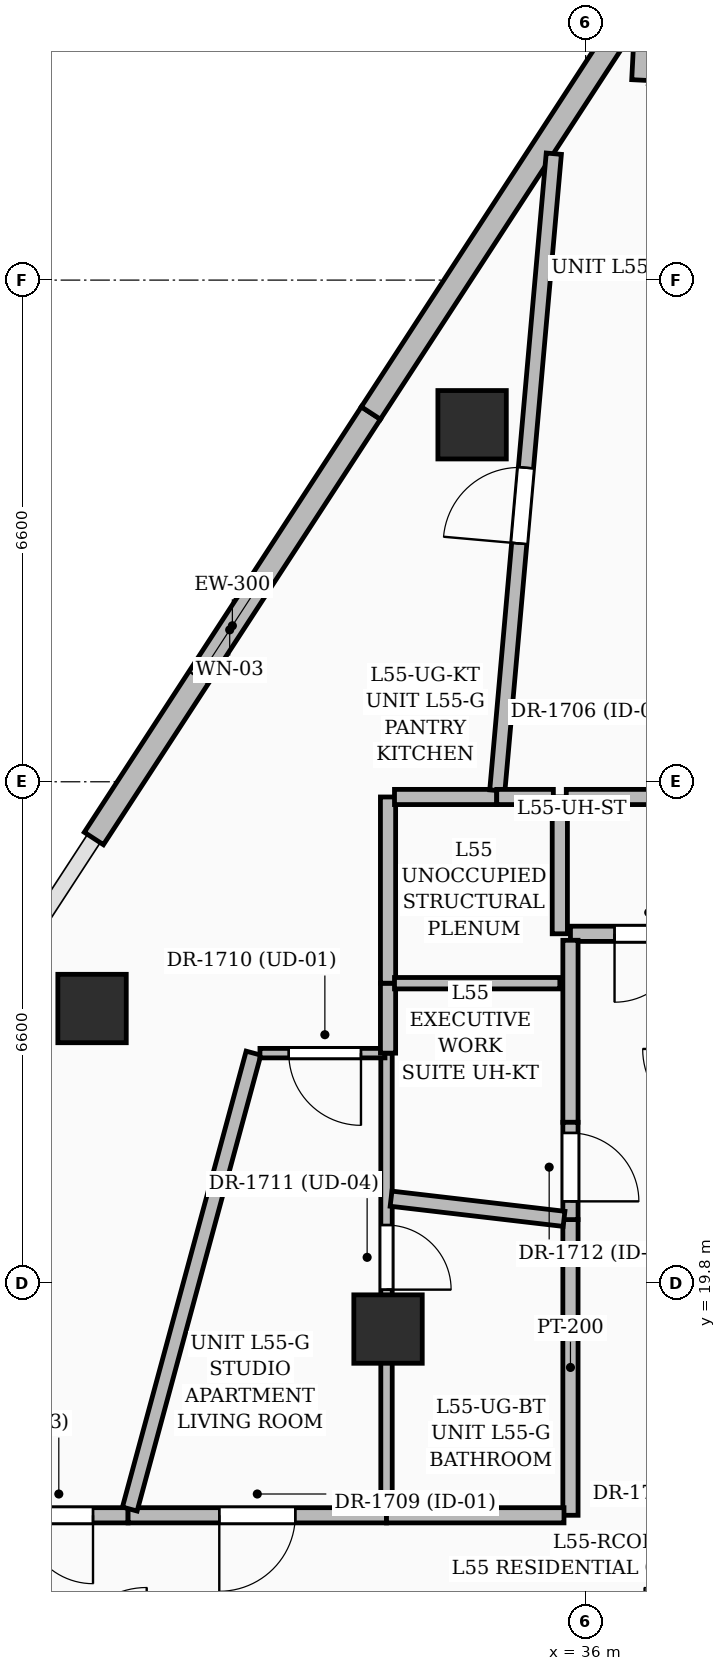
"""IFC4 building model, lengths in metres.
Left out: names, types, materials, properties, quantities, classifications, styles, units other than length and angle.
Written with IfcOpenShell. Run it as: python <this file> out.ifc"""

import sys

from ifc_helpers import new_model, si_unit, direction, frame, frame_2d, origin, origin_2d, place, context, subcontext, project, spatial, rectangle, extrude, element, fill, save


model = new_model("IFC4")
c1 = context("Model", 3, precision=1e-05, world=origin(), true_north=direction((0.0, 1.0)))
c2 = subcontext(c1, "Body", "Model", "MODEL_VIEW")
j1 = project(units=[si_unit("LENGTHUNIT", "METRE"), si_unit("PLANEANGLEUNIT", "RADIAN")], contexts=[c1])
p1 = place(None, origin())
s1 = spatial("IfcSite", under=j1, at=p1, CompositionType="ELEMENT")
p2 = place(p1, origin())
s2 = spatial("IfcBuilding", under=s1, at=p2, CompositionType="ELEMENT")
p3 = place(p2, frame((0.0, 0.0, 214.5)))
s3 = spatial("IfcBuildingStorey", under=s2, at=p3, CompositionType="ELEMENT", Elevation=214.5)
for number, where, z_axis, x_axis in (
    (1, (33.4, 19.2, 0.0), (0.0, 0.0, 1.0), (1.0, 0.0, 0.0)),
    (2, (34.506, 31.097, 0.0), (0.0, 0.0, 1.0), (1.0, 0.0, 0.0)),
    (3, (29.506, 23.417, 0.0), (0.0, 0.0, 1.0), (1.0, 0.0, 0.0)),
):
    element("IfcColumn", number, at=place(p3, frame(where, z_axis=z_axis, x_axis=x_axis)), inside=s3, PredefinedType="COLUMN", context=c2, shape_type="SweptSolid", body=[
        extrude(rectangle(XDim=0.9, YDim=0.9, at=origin_2d()), origin(), (0.0, 0.0, 1.0), 3.75),
    ])
p4 = place(p3, frame((29.53, 25.654, 0.0), z_axis=(0.0, 0.0, 1.0), x_axis=(0.545624217243, 0.838029959821, 0.0)))
e4 = element("IfcWall", 4, at=p4, inside=s3, PredefinedType="SOLIDWALL", context=c2, shape_type="SweptSolid", body=[
    extrude(rectangle(XDim=6.679, YDim=0.3, at=frame_2d((3.339, 0.0))), origin(), (0.0, 0.0, 1.0), 3.5),
])
p5 = place(p4, frame((2.525, 0.0, 0.6)))
e5 = element("IfcOpeningElement", 5, at=p5, cuts=e4, PredefinedType="OPENING", context=c2, shape_type="SweptSolid", body=[
    extrude(rectangle(XDim=1.5, YDim=2.1, at=frame_2d((0.75, 1.05))), frame((0.0, 0.16, 0.0), z_axis=(0.0, -1.0, 0.0), x_axis=(1.0, 0.0, 0.0)), (0.0, 0.0, 1.0), 0.32),
])
p6 = place(p3, frame((33.174, 31.251, 0.0), z_axis=(0.0, 0.0, 1.0), x_axis=(0.545624217243, 0.838029959821, 0.0)))
e6 = element("IfcWall", 6, at=p6, inside=s3, PredefinedType="SOLIDWALL", context=c2, shape_type="SweptSolid", body=[
    extrude(rectangle(XDim=6.679, YDim=0.3, at=frame_2d((3.339, 0.0))), origin(), (0.0, 0.0, 1.0), 3.5),
])
p7 = place(p3, frame((36.795, 36.394, 0.0), z_axis=(0.0, 0.0, 1.0), x_axis=(-0.051035290984, -0.998696850438, 0.0)))
e7 = element("IfcWall", 7, at=p7, inside=s3, PredefinedType="SOLIDWALL", context=c2, shape_type="SweptSolid", body=[
    extrude(rectangle(XDim=0.765, YDim=0.3, at=frame_2d((0.383, 0.0))), origin(), (0.0, 0.0, 1.0), 3.5),
])
p8 = place(p3, frame((29.98, 16.75, 0.0), z_axis=(0.0, 0.0, 1.0), x_axis=(-1.0, 0.0, 0.0)))
e8 = element("IfcWall", 8, at=p8, inside=s3, PredefinedType="PARTITIONING", context=c2, shape_type="SweptSolid", body=[
    extrude(rectangle(XDim=1.845, YDim=0.2, at=frame_2d((0.922, 0.0))), origin(), (0.0, 0.0, 1.0), 3.5),
])
p9 = place(p8, frame((0.461, 0.0, 0.0)))
e9 = element("IfcOpeningElement", 9, at=p9, cuts=e8, PredefinedType="OPENING", context=c2, shape_type="SweptSolid", body=[
    extrude(rectangle(XDim=0.9, YDim=2.1, at=frame_2d((0.45, 1.05))), frame((0.0, 0.11, 0.0), z_axis=(0.0, -1.0, 0.0), x_axis=(1.0, 0.0, 0.0)), (0.0, 0.0, 1.0), 0.22),
])
p10 = place(p3, frame((33.38, 16.75, 0.0), z_axis=(0.0, 0.0, 1.0), x_axis=(-1.0, 0.0, 0.0)))
e10 = element("IfcWall", 10, at=p10, inside=s3, PredefinedType="PARTITIONING", context=c2, shape_type="SweptSolid", body=[
    extrude(rectangle(XDim=3.4, YDim=0.2, at=frame_2d((1.7, 0.0))), origin(), (0.0, 0.0, 1.0), 3.5),
])
p11 = place(p10, frame((1.2, 0.0, 0.0)))
e11 = element("IfcOpeningElement", 11, at=p11, cuts=e10, PredefinedType="OPENING", context=c2, shape_type="SweptSolid", body=[
    extrude(rectangle(XDim=1.0, YDim=2.2, at=frame_2d((0.5, 1.1))), frame((0.0, 0.11, 0.0), z_axis=(0.0, -1.0, 0.0), x_axis=(1.0, 0.0, 0.0)), (0.0, 0.0, 1.0), 0.22),
])
p12 = place(p3, frame((35.8, 20.64, 0.0), z_axis=(0.0, 0.0, 1.0), x_axis=(0.0, -1.0, 0.0)))
e12 = element("IfcWall", 12, at=p12, inside=s3, PredefinedType="PARTITIONING", context=c2, shape_type="SweptSolid", body=[
    extrude(rectangle(XDim=3.89, YDim=0.2, at=frame_2d((1.945, 0.0))), origin(), (0.0, 0.0, 1.0), 3.5),
])
p13 = place(p3, frame((35.715, 16.75, 0.0), z_axis=(0.0, 0.0, 1.0), x_axis=(-1.0, 0.0, 0.0)))
e13 = element("IfcWall", 13, at=p13, inside=s3, PredefinedType="PARTITIONING", context=c2, shape_type="SweptSolid", body=[
    extrude(rectangle(XDim=2.335, YDim=0.2, at=frame_2d((1.167, 0.0))), origin(), (0.0, 0.0, 1.0), 2.685),
])
p14 = place(p3, frame((37.705, 24.4, 0.0), z_axis=(0.0, 0.0, 1.0), x_axis=(-1.0, 0.0, 0.0)))
e14 = element("IfcWall", 14, at=p14, inside=s3, PredefinedType="PARTITIONING", context=c2, shape_type="SweptSolid", body=[
    extrude(rectangle(XDim=1.905, YDim=0.2, at=frame_2d((0.953, 0.0))), origin(), (0.0, 0.0, 1.0), 2.685),
])
p15 = place(p14, frame((0.425, 0.0, 0.0)))
e15 = element("IfcOpeningElement", 15, at=p15, cuts=e14, PredefinedType="OPENING", context=c2, shape_type="SweptSolid", body=[
    extrude(rectangle(XDim=0.9, YDim=2.1, at=frame_2d((0.45, 1.05))), frame((0.0, 0.11, 0.0), z_axis=(0.0, -1.0, 0.0), x_axis=(1.0, 0.0, 0.0)), (0.0, 0.0, 1.0), 0.22),
])
p16 = place(p3, frame((35.8, 24.315, 0.0), z_axis=(0.0, 0.0, 1.0), x_axis=(0.0, -1.0, 0.0)))
e16 = element("IfcWall", 16, at=p16, inside=s3, PredefinedType="PARTITIONING", context=c2, shape_type="SweptSolid", body=[
    extrude(rectangle(XDim=2.395, YDim=0.2, at=frame_2d((1.198, 0.0))), origin(), (0.0, 0.0, 1.0), 2.685),
])
p17 = place(p3, frame((35.8, 21.92, 0.0), z_axis=(0.0, 0.0, 1.0), x_axis=(0.0, -1.0, 0.0)))
e17 = element("IfcWall", 17, at=p17, inside=s3, PredefinedType="PARTITIONING", context=c2, shape_type="SweptSolid", body=[
    extrude(rectangle(XDim=1.28, YDim=0.2, at=frame_2d((0.64, 0.0))), origin(), (0.0, 0.0, 1.0), 3.5),
])
p18 = place(p17, frame((0.14, 0.0, 0.0)))
e18 = element("IfcOpeningElement", 18, at=p18, cuts=e17, PredefinedType="OPENING", context=c2, shape_type="SweptSolid", body=[
    extrude(rectangle(XDim=0.9, YDim=2.1, at=frame_2d((0.45, 1.05))), frame((0.0, 0.11, 0.0), z_axis=(0.0, -1.0, 0.0), x_axis=(1.0, 0.0, 0.0)), (0.0, 0.0, 1.0), 0.22),
])
p19 = place(p3, frame((30.002, 16.832, 0.0), z_axis=(0.0, 0.0, 1.0), x_axis=(0.261897318596, 0.965095743702, 0.0)))
e19 = element("IfcWall", 19, at=p19, inside=s3, PredefinedType="PARTITIONING", context=c2, shape_type="SweptSolid", body=[
    extrude(rectangle(XDim=6.215, YDim=0.2, at=frame_2d((3.107, 0.0))), origin(), (0.0, 0.0, 1.0), 2.685),
])
p20 = place(p3, frame((33.38, 22.83, 0.0), z_axis=(0.0, 0.0, 1.0), x_axis=(0.0, -1.0, 0.0)))
e20 = element("IfcWall", 20, at=p20, inside=s3, PredefinedType="PARTITIONING", context=c2, shape_type="SweptSolid", body=[
    extrude(rectangle(XDim=5.995, YDim=0.15, at=frame_2d((2.998, 0.0))), origin(), (0.0, 0.0, 1.0), 2.685),
])
p21 = place(p20, frame((2.261, 0.0, 0.0)))
e21 = element("IfcOpeningElement", 21, at=p21, cuts=e20, PredefinedType="OPENING", context=c2, shape_type="SweptSolid", body=[
    extrude(rectangle(XDim=0.85, YDim=2.1, at=frame_2d((0.425, 1.05))), frame((0.0, 0.085, 0.0), z_axis=(0.0, -1.0, 0.0), x_axis=(1.0, 0.0, 0.0)), (0.0, 0.0, 1.0), 0.17),
])
p22 = place(p3, frame((33.36, 22.83, 0.0), z_axis=(0.0, 0.0, 1.0), x_axis=(-1.0, 0.0, 0.0)))
e22 = element("IfcWall", 22, at=p22, inside=s3, PredefinedType="PARTITIONING", context=c2, shape_type="SweptSolid", body=[
    extrude(rectangle(XDim=1.645, YDim=0.125, at=frame_2d((0.823, 0.0))), origin(), (0.0, 0.0, 1.0), 2.859),
])
p23 = place(p22, frame((0.316, 0.0, 0.0)))
e23 = element("IfcOpeningElement", 23, at=p23, cuts=e22, PredefinedType="OPENING", context=c2, shape_type="SweptSolid", body=[
    extrude(rectangle(XDim=0.95, YDim=2.2, at=frame_2d((0.475, 1.1))), frame((0.0, 0.072, 0.0), z_axis=(0.0, -1.0, 0.0), x_axis=(1.0, 0.0, 0.0)), (0.0, 0.0, 1.0), 0.145),
])
p24 = place(p3, frame((35.716, 20.65, 0.0), z_axis=(0.0, 0.0, 1.0), x_axis=(-0.993270086926, 0.11582113114, 0.0)))
e24 = element("IfcWall", 24, at=p24, inside=s3, PredefinedType="PARTITIONING", context=c2, shape_type="SweptSolid", body=[
    extrude(rectangle(XDim=2.291, YDim=0.2, at=frame_2d((1.146, 0.0))), origin(), (0.0, 0.0, 1.0), 2.685),
])
p25 = place(p3, frame((33.4, 22.83, 0.0), z_axis=(0.0, 0.0, 1.0), x_axis=(0.0, 1.0, 0.0)))
e25 = element("IfcWall", 25, at=p25, inside=s3, PredefinedType="PARTITIONING", context=c2, shape_type="SweptSolid", body=[
    extrude(rectangle(XDim=0.92, YDim=0.2, at=frame_2d((0.46, 0.0))), origin(), (0.0, 0.0, 1.0), 3.5),
])
p26 = place(p3, frame((33.4, 23.75, 0.0), z_axis=(0.0, 0.0, 1.0), x_axis=(0.0, 1.0, 0.0)))
e26 = element("IfcWall", 26, at=p26, inside=s3, PredefinedType="PARTITIONING", context=c2, shape_type="SweptSolid", body=[
    extrude(rectangle(XDim=2.45, YDim=0.2, at=frame_2d((1.225, 0.0))), origin(), (0.0, 0.0, 1.0), 2.859),
])
p27 = place(p3, frame((33.485, 26.2, 0.0), z_axis=(0.0, 0.0, 1.0), x_axis=(1.0, 0.0, 0.0)))
e27 = element("IfcWall", 27, at=p27, inside=s3, PredefinedType="PARTITIONING", context=c2, shape_type="SweptSolid", body=[
    extrude(rectangle(XDim=1.345, YDim=0.2, at=frame_2d((0.672, 0.0))), origin(), (0.0, 0.0, 1.0), 2.859),
])
p28 = place(p3, frame((34.838, 26.285, 0.0), z_axis=(0.0, 0.0, 1.0), x_axis=(0.088352923437, 0.996089233412, 0.0)))
e28 = element("IfcWall", 28, at=p28, inside=s3, PredefinedType="PARTITIONING", context=c2, shape_type="SweptSolid", body=[
    extrude(rectangle(XDim=8.411, YDim=0.2, at=frame_2d((4.206, 0.0))), origin(), (0.0, 0.0, 1.0), 2.685),
])
p29 = place(p28, frame((3.264, 0.0, 0.0)))
e29 = element("IfcOpeningElement", 29, at=p29, cuts=e28, PredefinedType="OPENING", context=c2, shape_type="SweptSolid", body=[
    extrude(rectangle(XDim=1.0, YDim=2.2, at=frame_2d((0.5, 1.1))), frame((0.0, 0.11, 0.0), z_axis=(0.0, -1.0, 0.0), x_axis=(1.0, 0.0, 0.0)), (0.0, 0.0, 1.0), 0.22),
])
p30 = place(p3, frame((35.66, 26.2, 0.0), z_axis=(0.0, 0.0, 1.0), x_axis=(0.0, -1.0, 0.0)))
e30 = element("IfcWall", 30, at=p30, inside=s3, PredefinedType="PARTITIONING", context=c2, shape_type="SweptSolid", body=[
    extrude(rectangle(XDim=1.8, YDim=0.2, at=frame_2d((0.9, 0.0))), origin(), (0.0, 0.0, 1.0), 3.5),
])
p31 = place(p3, frame((37.665, 26.2, 0.0), z_axis=(0.0, 0.0, 1.0), x_axis=(-1.0, 0.0, 0.0)))
e31 = element("IfcWall", 31, at=p31, inside=s3, PredefinedType="PARTITIONING", context=c2, shape_type="SweptSolid", body=[
    extrude(rectangle(XDim=1.92, YDim=0.2, at=frame_2d((0.96, 0.0))), origin(), (0.0, 0.0, 1.0), 3.5),
])
p32 = place(p3, frame((35.66, 23.75, 0.0), z_axis=(0.0, 0.0, 1.0), x_axis=(-1.0, 0.0, 0.0)))
e32 = element("IfcWall", 32, at=p32, inside=s3, PredefinedType="PARTITIONING", context=c2, shape_type="SweptSolid", body=[
    extrude(rectangle(XDim=2.175, YDim=0.15, at=frame_2d((1.087, 0.0))), origin(), (0.0, 0.0, 1.0), 3.5),
])
p33 = place(p3, frame((35.575, 26.2, 0.0), z_axis=(0.0, 0.0, 1.0), x_axis=(-1.0, 0.0, 0.0)))
e33 = element("IfcWall", 33, at=p33, inside=s3, PredefinedType="PARTITIONING", context=c2, shape_type="SweptSolid", body=[
    extrude(rectangle(XDim=0.745, YDim=0.2, at=frame_2d((0.373, 0.0))), origin(), (0.0, 0.0, 1.0), 3.5),
])
p34 = place(p5, origin())
e34 = element("IfcWindow", 34, at=p34, inside=s3, PartitioningType="SINGLE_PANEL", PredefinedType="WINDOW", context=c2, shape_type="SweptSolid", body=[
    extrude(rectangle(XDim=1.5, YDim=2.1, at=frame_2d((0.75, 1.05))), frame((0.0, 0.03, 0.0), z_axis=(0.0, -1.0, 0.0), x_axis=(1.0, 0.0, 0.0)), (0.0, 0.0, 1.0), 0.06),
])
fill(e5, e34)
p35 = place(p9, origin())
e35 = element("IfcDoor", 35, at=p35, inside=s3, OperationType="SINGLE_SWING_LEFT", PredefinedType="DOOR", context=c2, shape_type="SweptSolid", body=[
    extrude(rectangle(XDim=0.9, YDim=2.1, at=frame_2d((0.45, 1.05))), frame((0.0, 0.025, 0.0), z_axis=(0.0, -1.0, 0.0), x_axis=(1.0, 0.0, 0.0)), (0.0, 0.0, 1.0), 0.05),
])
fill(e9, e35)
p36 = place(p15, origin())
e36 = element("IfcDoor", 36, at=p36, inside=s3, OperationType="SINGLE_SWING_RIGHT", PredefinedType="DOOR", context=c2, shape_type="SweptSolid", body=[
    extrude(rectangle(XDim=0.9, YDim=2.1, at=frame_2d((0.45, 1.05))), frame((0.0, 0.025, 0.0), z_axis=(0.0, -1.0, 0.0), x_axis=(1.0, 0.0, 0.0)), (0.0, 0.0, 1.0), 0.05),
])
fill(e15, e36)
p37 = place(p11, origin())
e37 = element("IfcDoor", 37, at=p37, inside=s3, OperationType="SINGLE_SWING_RIGHT", PredefinedType="DOOR", context=c2, shape_type="SweptSolid", body=[
    extrude(rectangle(XDim=1.0, YDim=2.2, at=frame_2d((0.5, 1.1))), frame((0.0, 0.025, 0.0), z_axis=(0.0, -1.0, 0.0), x_axis=(1.0, 0.0, 0.0)), (0.0, 0.0, 1.0), 0.05),
])
fill(e11, e37)
p38 = place(p23, origin())
e38 = element("IfcDoor", 38, at=p38, inside=s3, OperationType="SINGLE_SWING_LEFT", PredefinedType="DOOR", context=c2, shape_type="SweptSolid", body=[
    extrude(rectangle(XDim=0.95, YDim=2.2, at=frame_2d((0.475, 1.1))), frame((0.0, 0.025, 0.0), z_axis=(0.0, -1.0, 0.0), x_axis=(1.0, 0.0, 0.0)), (0.0, 0.0, 1.0), 0.05),
])
fill(e23, e38)
p39 = place(p21, origin())
e39 = element("IfcDoor", 39, at=p39, inside=s3, OperationType="SINGLE_SWING_RIGHT", PredefinedType="DOOR", context=c2, shape_type="SweptSolid", body=[
    extrude(rectangle(XDim=0.85, YDim=2.1, at=frame_2d((0.425, 1.05))), frame((0.0, 0.025, 0.0), z_axis=(0.0, -1.0, 0.0), x_axis=(1.0, 0.0, 0.0)), (0.0, 0.0, 1.0), 0.05),
])
fill(e21, e39)
p40 = place(p18, origin())
e40 = element("IfcDoor", 40, at=p40, inside=s3, OperationType="SINGLE_SWING_RIGHT", PredefinedType="DOOR", context=c2, shape_type="SweptSolid", body=[
    extrude(rectangle(XDim=0.9, YDim=2.1, at=frame_2d((0.45, 1.05))), frame((0.0, 0.025, 0.0), z_axis=(0.0, -1.0, 0.0), x_axis=(1.0, 0.0, 0.0)), (0.0, 0.0, 1.0), 0.05),
])
fill(e18, e40)
p41 = place(p29, origin())
e41 = element("IfcDoor", 41, at=p41, inside=s3, OperationType="SINGLE_SWING_LEFT", PredefinedType="DOOR", context=c2, shape_type="SweptSolid", body=[
    extrude(rectangle(XDim=1.0, YDim=2.2, at=frame_2d((0.5, 1.1))), frame((0.0, 0.025, 0.0), z_axis=(0.0, -1.0, 0.0), x_axis=(1.0, 0.0, 0.0)), (0.0, 0.0, 1.0), 0.05),
])
fill(e29, e41)
save(model, sys.argv[1])
